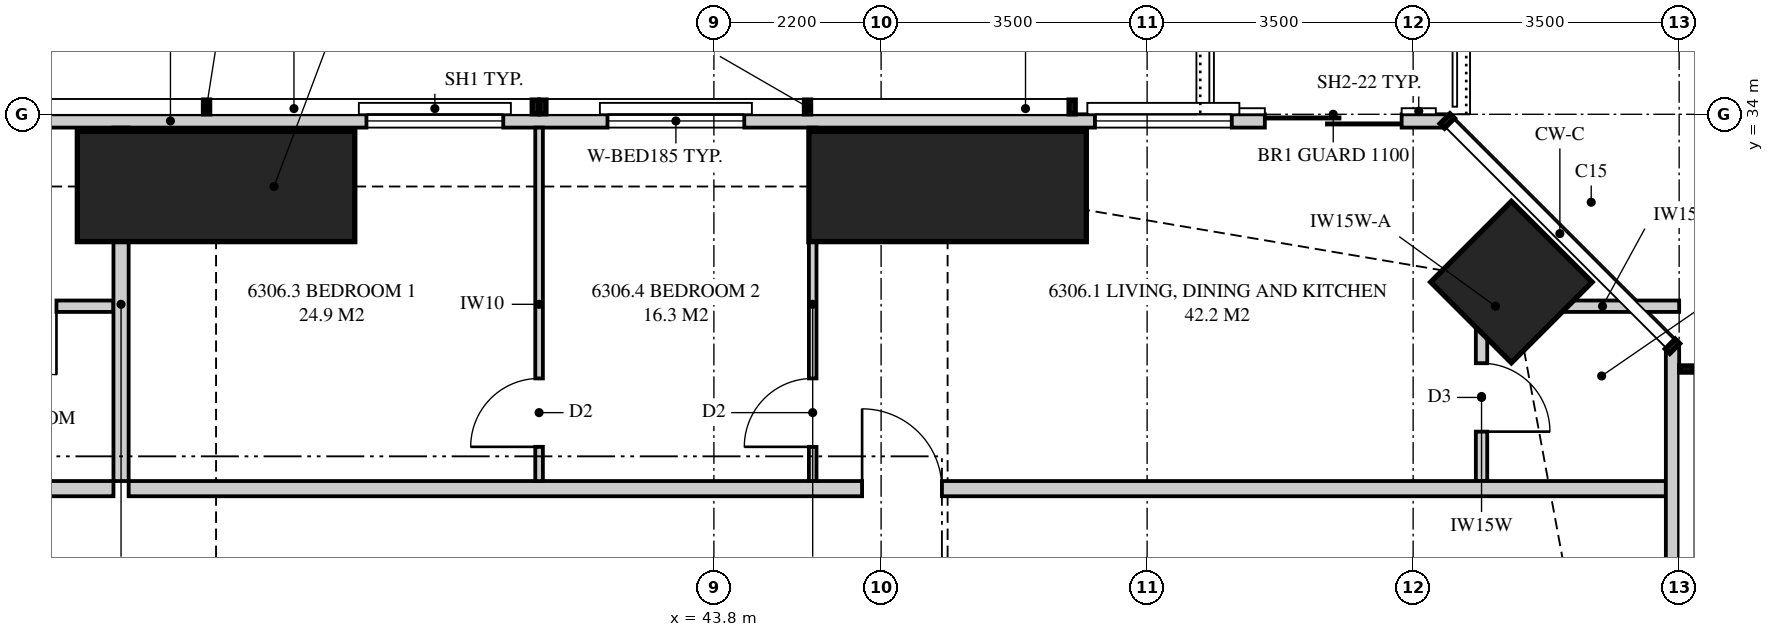
"""IFC4 building model, lengths in metres.
Left out: names, types, materials, properties, quantities, classifications, styles, units other than length and angle.
Written with IfcOpenShell. Run it as: python <this file> out.ifc"""

import sys

from ifc_helpers import new_model, si_unit, direction, frame, frame_2d, origin, origin_2d, place, context, subcontext, project, spatial, polyline, rectangle, outline, extrude, element, fill, save


model = new_model("IFC4")
c1 = context("Model", 3, precision=1e-05, world=origin(), true_north=direction((0.0, 1.0)))
c2 = subcontext(c1, "Body", "Model", "MODEL_VIEW")
j1 = project(units=[si_unit("LENGTHUNIT", "METRE"), si_unit("PLANEANGLEUNIT", "RADIAN")], contexts=[c1])
p1 = place(None, origin())
s1 = spatial("IfcSite", under=j1, at=p1, CompositionType="ELEMENT")
p2 = place(p1, origin())
s2 = spatial("IfcBuilding", under=s1, at=p2, CompositionType="ELEMENT")
p3 = place(p2, frame((0.0, 0.0, 231.95)))
s3 = spatial("IfcBuildingStorey", under=s2, at=p3, CompositionType="ELEMENT", Elevation=231.95)
p4 = place(p3, frame((54.293, 31.793, 0.0), z_axis=(0.0, 0.0, 1.0), x_axis=(0.707106781187, 0.707106781187, 0.0)))
e1 = element("IfcColumn", 1, at=p4, inside=s3, PredefinedType="COLUMN", context=c2, shape_type="SweptSolid", body=[
    extrude(rectangle(XDim=1.5, YDim=1.5, at=origin_2d()), origin(), (0.0, 0.0, 1.0), 3.5),
])
for number, where, z_axis, x_axis in (
    (2, (46.875, 33.05, 0.0), (0.0, 0.0, 1.0), (0.0, 1.0, 0.0)),
    (3, (37.25, 33.05, 0.0), (0.0, 0.0, 1.0), (0.0, 1.0, 0.0)),
):
    element("IfcColumn", number, at=place(p3, frame(where, z_axis=z_axis, x_axis=x_axis)), inside=s3, PredefinedType="COLUMN", context=c2, shape_type="SweptSolid", body=[
        extrude(rectangle(XDim=1.45, YDim=3.65, at=origin_2d()), origin(), (0.0, 0.0, 1.0), 3.5),
    ])
p5 = place(p3, frame((56.413, 3.051, 0.0), z_axis=(0.0, 0.0, 1.0), x_axis=(0.0, 1.0, 0.0)))
e4 = element("IfcWall", 4, at=p5, inside=s3, PredefinedType="SOLIDWALL", context=c2, shape_type="SweptSolid", body=[
    extrude(outline(polyline([(0.0, 0.0), (27.897, 0.0), (27.897, 3.26), (22.157, 3.26), (22.157, 2.3), (22.092, 2.3), (22.092, 3.26), (21.949, 3.26), (21.949, 2.3), (9.949, 2.3), (9.949, 3.26), (9.858, 3.26), (9.858, 2.3), (9.688, 2.3), (9.688, 3.26), (0.0, 3.26), (0.0, 0.0)])), frame((0.0, 0.087, 0.0), z_axis=(0.0, -1.0, 0.0), x_axis=(1.0, 0.0, 0.0)), (0.0, 0.0, 1.0), 0.175),
])
p6 = place(p5, frame((1.187, 0.0, 0.4)))
e5 = element("IfcOpeningElement", 5, at=p6, cuts=e4, PredefinedType="OPENING", context=c2, shape_type="SweptSolid", body=[
    extrude(rectangle(XDim=2.4, YDim=1.85, at=frame_2d((1.2, 0.925))), frame((0.0, 0.097, 0.0), z_axis=(0.0, -1.0, 0.0), x_axis=(1.0, 0.0, 0.0)), (0.0, 0.0, 1.0), 0.195),
])
p7 = place(p5, frame((11.897, 0.0, 0.4)))
e6 = element("IfcOpeningElement", 6, at=p7, cuts=e4, PredefinedType="OPENING", context=c2, shape_type="SweptSolid", body=[
    extrude(rectangle(XDim=1.8, YDim=1.85, at=frame_2d((0.9, 0.925))), frame((0.0, 0.097, 0.0), z_axis=(0.0, -1.0, 0.0), x_axis=(1.0, 0.0, 0.0)), (0.0, 0.0, 1.0), 0.195),
])
p8 = place(p5, frame((14.824, 0.0, 0.0)))
e7 = element("IfcOpeningElement", 7, at=p8, cuts=e4, PredefinedType="OPENING", context=c2, shape_type="SweptSolid", body=[
    extrude(rectangle(XDim=1.8, YDim=2.25, at=frame_2d((0.9, 1.125))), frame((0.0, 0.097, 0.0), z_axis=(0.0, -1.0, 0.0), x_axis=(1.0, 0.0, 0.0)), (0.0, 0.0, 1.0), 0.195),
])
p9 = place(p5, frame((18.224, 0.0, 0.4)))
e8 = element("IfcOpeningElement", 8, at=p9, cuts=e4, PredefinedType="OPENING", context=c2, shape_type="SweptSolid", body=[
    extrude(rectangle(XDim=1.8, YDim=1.85, at=frame_2d((0.9, 0.925))), frame((0.0, 0.097, 0.0), z_axis=(0.0, -1.0, 0.0), x_axis=(1.0, 0.0, 0.0)), (0.0, 0.0, 1.0), 0.195),
])
p10 = place(p3, frame((53.449, 33.913, 0.0), z_axis=(0.0, 0.0, 1.0), x_axis=(-1.0, 0.0, 0.0)))
e9 = element("IfcWall", 9, at=p10, inside=s3, PredefinedType="SOLIDWALL", context=c2, shape_type="SweptSolid", body=[
    extrude(outline(polyline([(0.0, 0.0), (33.597, 0.0), (33.597, 3.26), (26.039, 3.26), (26.039, 2.3), (25.955, 2.3), (25.955, 3.26), (25.824, 3.26), (25.824, 2.3), (6.574, 2.3), (6.574, 3.26), (6.442, 3.26), (6.442, 2.3), (6.359, 2.3), (6.359, 3.26), (0.0, 3.26), (0.0, 0.0)])), frame((0.0, 0.087, 0.0), z_axis=(0.0, -1.0, 0.0), x_axis=(1.0, 0.0, 0.0)), (0.0, 0.0, 1.0), 0.175),
])
p11 = place(p10, frame((0.6, 0.0, 0.0)))
e10 = element("IfcOpeningElement", 10, at=p11, cuts=e9, PredefinedType="OPENING", context=c2, shape_type="SweptSolid", body=[
    extrude(rectangle(XDim=1.8, YDim=2.25, at=frame_2d((0.9, 1.125))), frame((0.0, 0.097, 0.0), z_axis=(0.0, -1.0, 0.0), x_axis=(1.0, 0.0, 0.0)), (0.0, 0.0, 1.0), 0.195),
])
p12 = place(p10, frame((2.835, 0.0, 0.4)))
e11 = element("IfcOpeningElement", 11, at=p12, cuts=e9, PredefinedType="OPENING", context=c2, shape_type="SweptSolid", body=[
    extrude(rectangle(XDim=1.8, YDim=1.85, at=frame_2d((0.9, 0.925))), frame((0.0, 0.097, 0.0), z_axis=(0.0, -1.0, 0.0), x_axis=(1.0, 0.0, 0.0)), (0.0, 0.0, 1.0), 0.195),
])
p13 = place(p10, frame((9.249, 0.0, 0.4)))
e12 = element("IfcOpeningElement", 12, at=p13, cuts=e9, PredefinedType="OPENING", context=c2, shape_type="SweptSolid", body=[
    extrude(rectangle(XDim=1.8, YDim=1.85, at=frame_2d((0.9, 0.925))), frame((0.0, 0.097, 0.0), z_axis=(0.0, -1.0, 0.0), x_axis=(1.0, 0.0, 0.0)), (0.0, 0.0, 1.0), 0.195),
])
p14 = place(p10, frame((12.42, 0.0, 0.4)))
e13 = element("IfcOpeningElement", 13, at=p14, cuts=e9, PredefinedType="OPENING", context=c2, shape_type="SweptSolid", body=[
    extrude(rectangle(XDim=1.8, YDim=1.85, at=frame_2d((0.9, 0.925))), frame((0.0, 0.097, 0.0), z_axis=(0.0, -1.0, 0.0), x_axis=(1.0, 0.0, 0.0)), (0.0, 0.0, 1.0), 0.195),
])
p15 = place(p10, frame((20.949, 0.0, 0.4)))
e14 = element("IfcOpeningElement", 14, at=p15, cuts=e9, PredefinedType="OPENING", context=c2, shape_type="SweptSolid", body=[
    extrude(rectangle(XDim=2.4, YDim=1.85, at=frame_2d((1.2, 0.925))), frame((0.0, 0.097, 0.0), z_axis=(0.0, -1.0, 0.0), x_axis=(1.0, 0.0, 0.0)), (0.0, 0.0, 1.0), 0.195),
])
p16 = place(p10, frame((29.073, 0.0, 0.4)))
e15 = element("IfcOpeningElement", 15, at=p16, cuts=e9, PredefinedType="OPENING", context=c2, shape_type="SweptSolid", body=[
    extrude(rectangle(XDim=2.4, YDim=1.85, at=frame_2d((1.2, 0.925))), frame((0.0, 0.097, 0.0), z_axis=(0.0, -1.0, 0.0), x_axis=(1.0, 0.0, 0.0)), (0.0, 0.0, 1.0), 0.195),
])
p17 = place(p3, frame((36.0, 33.825, 0.0), z_axis=(0.0, 0.0, 1.0), x_axis=(0.0, -1.0, 0.0)))
e16 = element("IfcWall", 16, at=p17, inside=s3, PredefinedType="PARTITIONING", context=c2, shape_type="SweptSolid", body=[
    extrude(outline(polyline([(0.529, 2.3), (0.0, 2.3), (0.0, 0.0), (0.529, 0.0), (0.529, 0.281), (1.021, 0.281), (1.021, 0.0), (4.65, 0.0), (4.65, 2.66), (1.685, 2.66), (1.685, 2.3), (1.021, 2.3), (1.021, 2.019), (0.529, 2.019), (0.529, 2.3)])), frame((0.0, 0.1, 0.0), z_axis=(0.0, -1.0, 0.0), x_axis=(1.0, 0.0, 0.0)), (0.0, 0.0, 1.0), 0.2),
])
p18 = place(p3, frame((26.7, 29.075, 0.0), z_axis=(0.0, 0.0, 1.0), x_axis=(1.0, 0.0, 0.0)))
e17 = element("IfcWall", 17, at=p18, inside=s3, PredefinedType="PARTITIONING", context=c2, shape_type="SweptSolid", body=[
    extrude(outline(polyline([(0.0, 0.0), (9.2, 0.0), (9.2, 3.26), (2.235, 3.26), (2.235, 2.66), (0.0, 2.66), (0.0, 3.26), (0.0, 0.0)])), frame((0.0, 0.1, 0.0), z_axis=(0.0, -1.0, 0.0), x_axis=(1.0, 0.0, 0.0)), (0.0, 0.0, 1.0), 0.2),
])
p19 = place(p18, frame((4.1, 0.0, 0.0)))
e18 = element("IfcOpeningElement", 18, at=p19, cuts=e17, PredefinedType="OPENING", context=c2, shape_type="SweptSolid", body=[
    extrude(rectangle(XDim=1.05, YDim=2.2, at=frame_2d((0.525, 1.1))), frame((0.0, 0.11, 0.0), z_axis=(0.0, -1.0, 0.0), x_axis=(1.0, 0.0, 0.0)), (0.0, 0.0, 1.0), 0.22),
])
p20 = place(p3, frame((33.475, 31.475, 0.0), z_axis=(0.0, 0.0, 1.0), x_axis=(1.0, 0.0, 0.0)))
e19 = element("IfcWall", 19, at=p20, inside=s3, PredefinedType="PLUMBINGWALL", context=c2, shape_type="SweptSolid", body=[
    extrude(rectangle(XDim=2.425, YDim=0.15, at=frame_2d((1.212, 0.0))), origin(), (0.0, 0.0, 1.0), 3.26),
])
p21 = place(p20, frame((0.775, 0.0, 0.0)))
e20 = element("IfcOpeningElement", 20, at=p21, cuts=e19, PredefinedType="OPENING", context=c2, shape_type="SweptSolid", body=[
    extrude(rectangle(XDim=0.9, YDim=2.1, at=frame_2d((0.45, 1.05))), frame((0.0, 0.085, 0.0), z_axis=(0.0, -1.0, 0.0), x_axis=(1.0, 0.0, 0.0)), (0.0, 0.0, 1.0), 0.17),
])
p22 = place(p3, frame((36.1, 29.075, 0.0), z_axis=(0.0, 0.0, 1.0), x_axis=(1.0, 0.0, 0.0)))
e21 = element("IfcWall", 21, at=p22, inside=s3, PredefinedType="PARTITIONING", context=c2, shape_type="SweptSolid", body=[
    extrude(outline(polyline([(0.0, 0.0), (20.225, 0.0), (20.225, 3.26), (19.621, 3.26), (19.621, 2.3), (17.771, 2.3), (17.771, 3.26), (12.085, 3.26), (12.085, 2.66), (9.465, 2.66), (9.465, 3.26), (2.46, 3.26), (2.46, 2.66), (0.0, 2.66), (0.0, 3.26), (0.0, 0.0)])), frame((0.0, 0.1, 0.0), z_axis=(0.0, -1.0, 0.0), x_axis=(1.0, 0.0, 0.0)), (0.0, 0.0, 1.0), 0.2),
])
p23 = place(p22, frame((9.65, 0.0, 0.0)))
e22 = element("IfcOpeningElement", 22, at=p23, cuts=e21, PredefinedType="OPENING", context=c2, shape_type="SweptSolid", body=[
    extrude(rectangle(XDim=1.05, YDim=2.2, at=frame_2d((0.525, 1.1))), frame((0.0, 0.11, 0.0), z_axis=(0.0, -1.0, 0.0), x_axis=(1.0, 0.0, 0.0)), (0.0, 0.0, 1.0), 0.22),
])
p24 = place(p3, frame((53.975, 31.475, 0.0), z_axis=(0.0, 0.0, 1.0), x_axis=(1.0, 0.0, 0.0)))
e23 = element("IfcWall", 23, at=p24, inside=s3, PredefinedType="PLUMBINGWALL", context=c2, shape_type="SweptSolid", body=[
    extrude(rectangle(XDim=0.217, YDim=0.15, at=frame_2d((0.108, 0.0))), origin(), (0.0, 0.0, 1.0), 2.3),
])
p25 = place(p3, frame((54.483, 31.475, 0.0), z_axis=(0.0, 0.0, 1.0), x_axis=(1.0, 0.0, 0.0)))
e24 = element("IfcWall", 24, at=p25, inside=s3, PredefinedType="PLUMBINGWALL", context=c2, shape_type="SweptSolid", body=[
    extrude(outline(polyline([(0.768, 3.26), (0.768, 2.3), (0.407, 2.3), (0.396, 2.239), (0.0, 1.15), (0.396, 0.061), (0.407, 0.0), (2.017, 0.0), (2.017, 3.26), (0.768, 3.26)])), frame((0.0, 0.075, 0.0), z_axis=(0.0, -1.0, 0.0), x_axis=(1.0, 0.0, 0.0)), (0.0, 0.0, 1.0), 0.15),
])
p26 = place(p3, frame((53.9, 31.4, 0.0), z_axis=(0.0, 0.0, 1.0), x_axis=(0.0, -1.0, 0.0)))
e25 = element("IfcWall", 25, at=p26, inside=s3, PredefinedType="PLUMBINGWALL", context=c2, shape_type="SweptSolid", body=[
    extrude(outline(polyline([(0.0, 0.0), (2.225, 0.0), (2.225, 3.26), (2.225, 2.3), (0.438, 2.3), (0.0, 2.3), (0.0, 3.26), (0.0, 0.0)])), frame((0.0, 0.075, 0.0), z_axis=(0.0, -1.0, 0.0), x_axis=(1.0, 0.0, 0.0)), (0.0, 0.0, 1.0), 0.15),
])
p27 = place(p26, frame((0.675, 0.0, 0.0)))
e26 = element("IfcOpeningElement", 26, at=p27, cuts=e25, PredefinedType="OPENING", context=c2, shape_type="SweptSolid", body=[
    extrude(rectangle(XDim=0.9, YDim=2.1, at=frame_2d((0.45, 1.05))), frame((0.0, 0.085, 0.0), z_axis=(0.0, -1.0, 0.0), x_axis=(1.0, 0.0, 0.0)), (0.0, 0.0, 1.0), 0.17),
])
p28 = place(p3, frame((41.5, 33.825, 0.0), z_axis=(0.0, 0.0, 1.0), x_axis=(0.0, -1.0, 0.0)))
e27 = element("IfcWall", 27, at=p28, inside=s3, PredefinedType="PARTITIONING", context=c2, shape_type="SweptSolid", body=[
    extrude(outline(polyline([(0.0, 0.0), (4.65, 0.0), (4.65, 3.26), (1.635, 3.26), (1.635, 2.3), (0.0, 2.3), (0.0, 3.26), (0.0, 0.0)])), frame((0.0, 0.05, 0.0), z_axis=(0.0, -1.0, 0.0), x_axis=(1.0, 0.0, 0.0)), (0.0, 0.0, 1.0), 0.1),
])
p29 = place(p28, frame((3.3, 0.0, 0.0)))
e28 = element("IfcOpeningElement", 28, at=p29, cuts=e27, PredefinedType="OPENING", context=c2, shape_type="SweptSolid", body=[
    extrude(rectangle(XDim=0.9, YDim=2.1, at=frame_2d((0.45, 1.05))), frame((0.0, 0.06, 0.0), z_axis=(0.0, -1.0, 0.0), x_axis=(1.0, 0.0, 0.0)), (0.0, 0.0, 1.0), 0.12),
])
p30 = place(p3, frame((45.1, 33.825, 0.0), z_axis=(0.0, 0.0, 1.0), x_axis=(0.0, -1.0, 0.0)))
e29 = element("IfcWall", 29, at=p30, inside=s3, PredefinedType="PARTITIONING", context=c2, shape_type="SweptSolid", body=[
    extrude(outline(polyline([(0.0, 0.0), (4.65, 0.0), (4.65, 3.26), (1.635, 3.26), (1.635, 2.3), (0.0, 2.3), (0.0, 3.26), (0.0, 0.0)])), frame((0.0, 0.05, 0.0), z_axis=(0.0, -1.0, 0.0), x_axis=(1.0, 0.0, 0.0)), (0.0, 0.0, 1.0), 0.1),
])
p31 = place(p30, frame((3.3, 0.0, 0.0)))
e30 = element("IfcOpeningElement", 30, at=p31, cuts=e29, PredefinedType="OPENING", context=c2, shape_type="SweptSolid", body=[
    extrude(rectangle(XDim=0.9, YDim=2.1, at=frame_2d((0.45, 1.05))), frame((0.0, 0.06, 0.0), z_axis=(0.0, -1.0, 0.0), x_axis=(1.0, 0.0, 0.0)), (0.0, 0.0, 1.0), 0.12),
])
p32 = place(p11, origin())
e31 = element("IfcDoor", 31, at=p32, inside=s3, OperationType="SLIDING_TO_LEFT", PredefinedType="DOOR", context=c2, shape_type="SweptSolid", body=[
    extrude(rectangle(XDim=1.8, YDim=2.25, at=frame_2d((0.9, 1.125))), frame((0.0, 0.025, 0.0), z_axis=(0.0, -1.0, 0.0), x_axis=(1.0, 0.0, 0.0)), (0.0, 0.0, 1.0), 0.05),
])
fill(e10, e31)
p33 = place(p12, origin())
e32 = element("IfcWindow", 32, at=p33, inside=s3, PartitioningType="SINGLE_PANEL", PredefinedType="WINDOW", context=c2, shape_type="SweptSolid", body=[
    extrude(rectangle(XDim=1.8, YDim=1.85, at=frame_2d((0.9, 0.925))), frame((0.0, 0.03, 0.0), z_axis=(0.0, -1.0, 0.0), x_axis=(1.0, 0.0, 0.0)), (0.0, 0.0, 1.0), 0.06),
])
fill(e11, e32)
p34 = place(p13, origin())
e33 = element("IfcWindow", 33, at=p34, inside=s3, PartitioningType="SINGLE_PANEL", PredefinedType="WINDOW", context=c2, shape_type="SweptSolid", body=[
    extrude(rectangle(XDim=1.8, YDim=1.85, at=frame_2d((0.9, 0.925))), frame((0.0, 0.03, 0.0), z_axis=(0.0, -1.0, 0.0), x_axis=(1.0, 0.0, 0.0)), (0.0, 0.0, 1.0), 0.06),
])
fill(e12, e33)
p35 = place(p14, origin())
e34 = element("IfcWindow", 34, at=p35, inside=s3, PartitioningType="SINGLE_PANEL", PredefinedType="WINDOW", context=c2, shape_type="SweptSolid", body=[
    extrude(rectangle(XDim=1.8, YDim=1.85, at=frame_2d((0.9, 0.925))), frame((0.0, 0.03, 0.0), z_axis=(0.0, -1.0, 0.0), x_axis=(1.0, 0.0, 0.0)), (0.0, 0.0, 1.0), 0.06),
])
fill(e13, e34)
p36 = place(p21, frame((0.9, 0.0, 0.0), z_axis=(0.0, 0.0, 1.0), x_axis=(-1.0, 0.0, 0.0)))
e35 = element("IfcDoor", 35, at=p36, inside=s3, OperationType="SINGLE_SWING_LEFT", PredefinedType="DOOR", context=c2, shape_type="SweptSolid", body=[
    extrude(rectangle(XDim=0.9, YDim=2.1, at=frame_2d((0.45, 1.05))), frame((0.0, 0.025, 0.0), z_axis=(0.0, -1.0, 0.0), x_axis=(1.0, 0.0, 0.0)), (0.0, 0.0, 1.0), 0.05),
])
fill(e20, e35)
p37 = place(p23, origin())
e36 = element("IfcDoor", 36, at=p37, inside=s3, OperationType="SINGLE_SWING_LEFT", PredefinedType="DOOR", context=c2, shape_type="SweptSolid", body=[
    extrude(rectangle(XDim=1.05, YDim=2.2, at=frame_2d((0.525, 1.1))), frame((0.0, 0.025, 0.0), z_axis=(0.0, -1.0, 0.0), x_axis=(1.0, 0.0, 0.0)), (0.0, 0.0, 1.0), 0.05),
])
fill(e22, e36)
p38 = place(p27, origin())
e37 = element("IfcDoor", 37, at=p38, inside=s3, OperationType="SINGLE_SWING_RIGHT", PredefinedType="DOOR", context=c2, shape_type="SweptSolid", body=[
    extrude(rectangle(XDim=0.9, YDim=2.1, at=frame_2d((0.45, 1.05))), frame((0.0, 0.025, 0.0), z_axis=(0.0, -1.0, 0.0), x_axis=(1.0, 0.0, 0.0)), (0.0, 0.0, 1.0), 0.05),
])
fill(e26, e37)
p39 = place(p29, frame((0.9, 0.0, 0.0), z_axis=(0.0, 0.0, 1.0), x_axis=(-1.0, 0.0, 0.0)))
e38 = element("IfcDoor", 38, at=p39, inside=s3, OperationType="SINGLE_SWING_LEFT", PredefinedType="DOOR", context=c2, shape_type="SweptSolid", body=[
    extrude(rectangle(XDim=0.9, YDim=2.1, at=frame_2d((0.45, 1.05))), frame((0.0, 0.025, 0.0), z_axis=(0.0, -1.0, 0.0), x_axis=(1.0, 0.0, 0.0)), (0.0, 0.0, 1.0), 0.05),
])
fill(e28, e38)
p40 = place(p31, frame((0.9, 0.0, 0.0), z_axis=(0.0, 0.0, 1.0), x_axis=(-1.0, 0.0, 0.0)))
e39 = element("IfcDoor", 39, at=p40, inside=s3, OperationType="SINGLE_SWING_LEFT", PredefinedType="DOOR", context=c2, shape_type="SweptSolid", body=[
    extrude(rectangle(XDim=0.9, YDim=2.1, at=frame_2d((0.45, 1.05))), frame((0.0, 0.025, 0.0), z_axis=(0.0, -1.0, 0.0), x_axis=(1.0, 0.0, 0.0)), (0.0, 0.0, 1.0), 0.05),
])
fill(e30, e39)
save(model, sys.argv[1])
